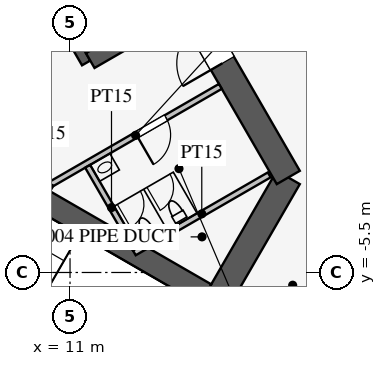
"""IFC4 building model, lengths in metres.
Left out: names, types, materials, properties, quantities, classifications, styles, units other than length and angle.
Written with IfcOpenShell. Run it as: python <this file> out.ifc"""

import sys

from ifc_helpers import new_model, si_unit, direction, frame, frame_2d, origin, place, context, subcontext, project, spatial, rectangle, extrude, element, fill, save


model = new_model("IFC4")
c1 = context("Model", 3, precision=1e-05, world=origin(), true_north=direction((0.0, 1.0)))
c2 = subcontext(c1, "Body", "Model", "MODEL_VIEW")
j1 = project(units=[si_unit("LENGTHUNIT", "METRE"), si_unit("PLANEANGLEUNIT", "RADIAN")], contexts=[c1])
p1 = place(None, origin())
s1 = spatial("IfcSite", under=j1, at=p1, CompositionType="ELEMENT")
p2 = place(p1, origin())
s2 = spatial("IfcBuilding", under=s1, at=p2, CompositionType="ELEMENT")
p3 = place(p2, frame((0.0, 0.0, 276.3)))
s3 = spatial("IfcBuildingStorey", under=s2, at=p3, CompositionType="ELEMENT", Elevation=276.3)
p4 = place(p3, frame((10.97, -13.0, 0.0), z_axis=(0.0, 0.0, 1.0), x_axis=(0.499995765644, 0.866027848477, 0.0)))
e1 = element("IfcWall", 1, at=p4, inside=s3, PredefinedType="SHEAR", context=c2, shape_type="SweptSolid", body=[
    extrude(rectangle(XDim=11.547, YDim=0.7, at=frame_2d((5.773, 0.0))), origin(), (0.0, 0.0, 1.0), 4.2),
])
p5 = place(p3, frame((16.743, -3.0, 0.0), z_axis=(0.0, 0.0, 1.0), x_axis=(-0.500002442456, 0.866023993627, 0.0)))
e2 = element("IfcWall", 2, at=p5, inside=s3, PredefinedType="SHEAR", context=c2, shape_type="SweptSolid", body=[
    extrude(rectangle(XDim=21.939, YDim=0.7, at=frame_2d((10.97, 0.0))), origin(), (0.0, 0.0, 1.0), 4.2),
])
p6 = place(p5, frame((17.27, 0.0, 0.0)))
e3 = element("IfcOpeningElement", 3, at=p6, cuts=e2, PredefinedType="OPENING", context=c2, shape_type="SweptSolid", body=[
    extrude(rectangle(XDim=1.2, YDim=2.1, at=frame_2d((0.6, 1.05))), frame((0.0, 0.36, 0.0), z_axis=(0.0, -1.0, 0.0), x_axis=(1.0, 0.0, 0.0)), (0.0, 0.0, 1.0), 0.72),
])
p7 = place(p5, frame((3.47, 0.0, 0.0)))
e4 = element("IfcOpeningElement", 4, at=p7, cuts=e2, PredefinedType="OPENING", context=c2, shape_type="SweptSolid", body=[
    extrude(rectangle(XDim=1.2, YDim=2.1, at=frame_2d((0.6, 1.05))), frame((0.0, 0.36, 0.0), z_axis=(0.0, -1.0, 0.0), x_axis=(1.0, 0.0, 0.0)), (0.0, 0.0, 1.0), 0.72),
])
p8 = place(p3, frame((11.424, 0.014, 0.0), z_axis=(0.0, 0.0, 1.0), x_axis=(-0.500001763848, 0.866024385424, 0.0)))
e5 = element("IfcWall", 5, at=p8, inside=s3, PredefinedType="SHEAR", context=c2, shape_type="SweptSolid", body=[
    extrude(rectangle(XDim=11.4, YDim=0.25, at=frame_2d((5.7, 0.0))), origin(), (0.0, 0.0, 1.0), 4.2),
])
p9 = place(p8, frame((0.975, 0.0, 0.0)))
e6 = element("IfcOpeningElement", 6, at=p9, cuts=e5, PredefinedType="OPENING", context=c2, shape_type="SweptSolid", body=[
    extrude(rectangle(XDim=0.9, YDim=2.1, at=frame_2d((0.45, 1.05))), frame((0.0, 0.135, 0.0), z_axis=(0.0, -1.0, 0.0), x_axis=(1.0, 0.0, 0.0)), (0.0, 0.0, 1.0), 0.27),
])
p10 = place(p8, frame((3.825, 0.0, 0.0)))
e7 = element("IfcOpeningElement", 7, at=p10, cuts=e5, PredefinedType="OPENING", context=c2, shape_type="SweptSolid", body=[
    extrude(rectangle(XDim=0.9, YDim=2.1, at=frame_2d((0.45, 1.05))), frame((0.0, 0.135, 0.0), z_axis=(0.0, -1.0, 0.0), x_axis=(1.0, 0.0, 0.0)), (0.0, 0.0, 1.0), 0.27),
])
p11 = place(p8, frame((6.675, 0.0, 0.0)))
e8 = element("IfcOpeningElement", 8, at=p11, cuts=e5, PredefinedType="OPENING", context=c2, shape_type="SweptSolid", body=[
    extrude(rectangle(XDim=0.9, YDim=2.1, at=frame_2d((0.45, 1.05))), frame((0.0, 0.135, 0.0), z_axis=(0.0, -1.0, 0.0), x_axis=(1.0, 0.0, 0.0)), (0.0, 0.0, 1.0), 0.27),
])
p12 = place(p8, frame((9.525, 0.0, 0.0)))
e9 = element("IfcOpeningElement", 9, at=p12, cuts=e5, PredefinedType="OPENING", context=c2, shape_type="SweptSolid", body=[
    extrude(rectangle(XDim=0.9, YDim=2.1, at=frame_2d((0.45, 1.05))), frame((0.0, 0.135, 0.0), z_axis=(0.0, -1.0, 0.0), x_axis=(1.0, 0.0, 0.0)), (0.0, 0.0, 1.0), 0.27),
])
p13 = place(p3, frame((11.532, 0.076, 0.0), z_axis=(0.0, 0.0, 1.0), x_axis=(0.866013657776, 0.500020344131, 0.0)))
e10 = element("IfcWall", 10, at=p13, inside=s3, PredefinedType="SHEAR", context=c2, shape_type="SweptSolid", body=[
    extrude(rectangle(XDim=2.625, YDim=0.45, at=frame_2d((1.312, 0.0))), origin(), (0.0, 0.0, 1.0), 4.2),
])
for number, where, z_axis, x_axis in (
    (11, (4.638, -5.016, 0.0), (0.0, 0.0, 1.0), (0.866, -0.5, 0.0)),
    (12, (6.663, -1.509, 0.0), (0.0, 0.0, 1.0), (0.866, -0.5, 0.0)),
):
    element("IfcWall", number, at=place(p3, frame(where, z_axis=z_axis, x_axis=x_axis)), inside=s3, PredefinedType="SHEAR", context=c2, shape_type="SweptSolid", body=[
        extrude(rectangle(XDim=9.125, YDim=0.6, at=frame_2d((4.562, 0.0))), origin(), (0.0, 0.0, 1.0), 4.2),
    ])
p14 = place(p3, frame((10.495, -3.178, 0.0), z_axis=(0.0, 0.0, 1.0), x_axis=(0.866037967349, 0.499978238636, 0.0)))
e13 = element("IfcWall", 13, at=p14, inside=s3, PredefinedType="PARTITIONING", context=c2, shape_type="SweptSolid", body=[
    extrude(rectangle(XDim=5.15, YDim=0.15, at=frame_2d((2.575, 0.0))), origin(), (0.0, 0.0, 1.0), 4.0),
])
p15 = place(p14, frame((2.6, 0.0, 0.0)))
e14 = element("IfcOpeningElement", 14, at=p15, cuts=e13, PredefinedType="OPENING", context=c2, shape_type="SweptSolid", body=[
    extrude(rectangle(XDim=0.9, YDim=2.1, at=frame_2d((0.45, 1.05))), frame((0.0, 0.085, 0.0), z_axis=(0.0, -1.0, 0.0), x_axis=(1.0, 0.0, 0.0)), (0.0, 0.0, 1.0), 0.17),
])
p16 = place(p3, frame((10.495, -3.178, 0.0), z_axis=(0.0, 0.0, 1.0), x_axis=(-0.499842556608, -0.866116284689, 0.0)))
e15 = element("IfcWall", 15, at=p16, inside=s3, PredefinedType="PARTITIONING", context=c2, shape_type="SweptSolid", body=[
    extrude(rectangle(XDim=0.645, YDim=0.15, at=frame_2d((0.323, 0.0))), origin(), (0.0, 0.0, 1.0), 4.0),
])
p17 = place(p3, frame((12.691, -4.982, 0.0), z_axis=(0.0, 0.0, 1.0), x_axis=(0.8660249478, 0.500000789788, 0.0)))
e16 = element("IfcWall", 16, at=p17, inside=s3, PredefinedType="PARTITIONING", context=c2, shape_type="SweptSolid", body=[
    extrude(rectangle(XDim=4.1, YDim=0.15, at=frame_2d((2.05, 0.0))), origin(), (0.0, 0.0, 1.0), 4.0),
])
p18 = place(p3, frame((11.464, -2.706, 0.0), z_axis=(0.0, 0.0, 1.0), x_axis=(0.50001992892, -0.866013897511, 0.0)))
e17 = element("IfcWall", 17, at=p18, inside=s3, PredefinedType="PARTITIONING", context=c2, shape_type="SweptSolid", body=[
    extrude(rectangle(XDim=2.51, YDim=0.15, at=frame_2d((1.255, 0.0))), origin(), (0.0, 0.0, 1.0), 4.0),
])
p19 = place(p3, frame((25.854, -14.361, 0.0), z_axis=(0.0, 0.0, 1.0), x_axis=(-0.499999496503, 0.866025694478, 0.0)))
e18 = element("IfcWall", 18, at=p19, inside=s3, PredefinedType="PARTITIONING", context=c2, shape_type="SweptSolid", body=[
    extrude(rectangle(XDim=50.728, YDim=0.12, at=frame_2d((25.364, 0.0))), origin(), (0.0, 0.0, 1.0), 2.9),
])
p20 = place(p19, frame((9.75, 0.0, 0.15)))
e19 = element("IfcOpeningElement", 19, at=p20, cuts=e18, PredefinedType="OPENING", context=c2, shape_type="SweptSolid", body=[
    extrude(rectangle(XDim=1.8, YDim=2.1, at=frame_2d((0.9, 1.05))), frame((0.0, 0.07, 0.0), z_axis=(0.0, -1.0, 0.0), x_axis=(1.0, 0.0, 0.0)), (0.0, 0.0, 1.0), 0.14),
])
p21 = place(p19, frame((39.2, 0.0, 0.15)))
e20 = element("IfcOpeningElement", 20, at=p21, cuts=e18, PredefinedType="OPENING", context=c2, shape_type="SweptSolid", body=[
    extrude(rectangle(XDim=1.8, YDim=2.1, at=frame_2d((0.9, 1.05))), frame((0.0, 0.07, 0.0), z_axis=(0.0, -1.0, 0.0), x_axis=(1.0, 0.0, 0.0)), (0.0, 0.0, 1.0), 0.14),
])
p22 = place(p15, frame((0.9, 0.0, 0.0), z_axis=(0.0, 0.0, 1.0), x_axis=(-1.0, 0.0, 0.0)))
e21 = element("IfcDoor", 21, at=p22, inside=s3, OperationType="SINGLE_SWING_RIGHT", PredefinedType="DOOR", context=c2, shape_type="SweptSolid", body=[
    extrude(rectangle(XDim=0.9, YDim=2.1, at=frame_2d((0.45, 1.05))), frame((0.0, 0.025, 0.0), z_axis=(0.0, -1.0, 0.0), x_axis=(1.0, 0.0, 0.0)), (0.0, 0.0, 1.0), 0.05),
])
fill(e14, e21)
p23 = place(p7, origin())
e22 = element("IfcDoor", 22, at=p23, inside=s3, OperationType="SINGLE_SWING_LEFT", PredefinedType="DOOR", context=c2, shape_type="SweptSolid", body=[
    extrude(rectangle(XDim=1.2, YDim=2.1, at=frame_2d((0.6, 1.05))), frame((0.0, 0.025, 0.0), z_axis=(0.0, -1.0, 0.0), x_axis=(1.0, 0.0, 0.0)), (0.0, 0.0, 1.0), 0.05),
])
fill(e4, e22)
save(model, sys.argv[1])
